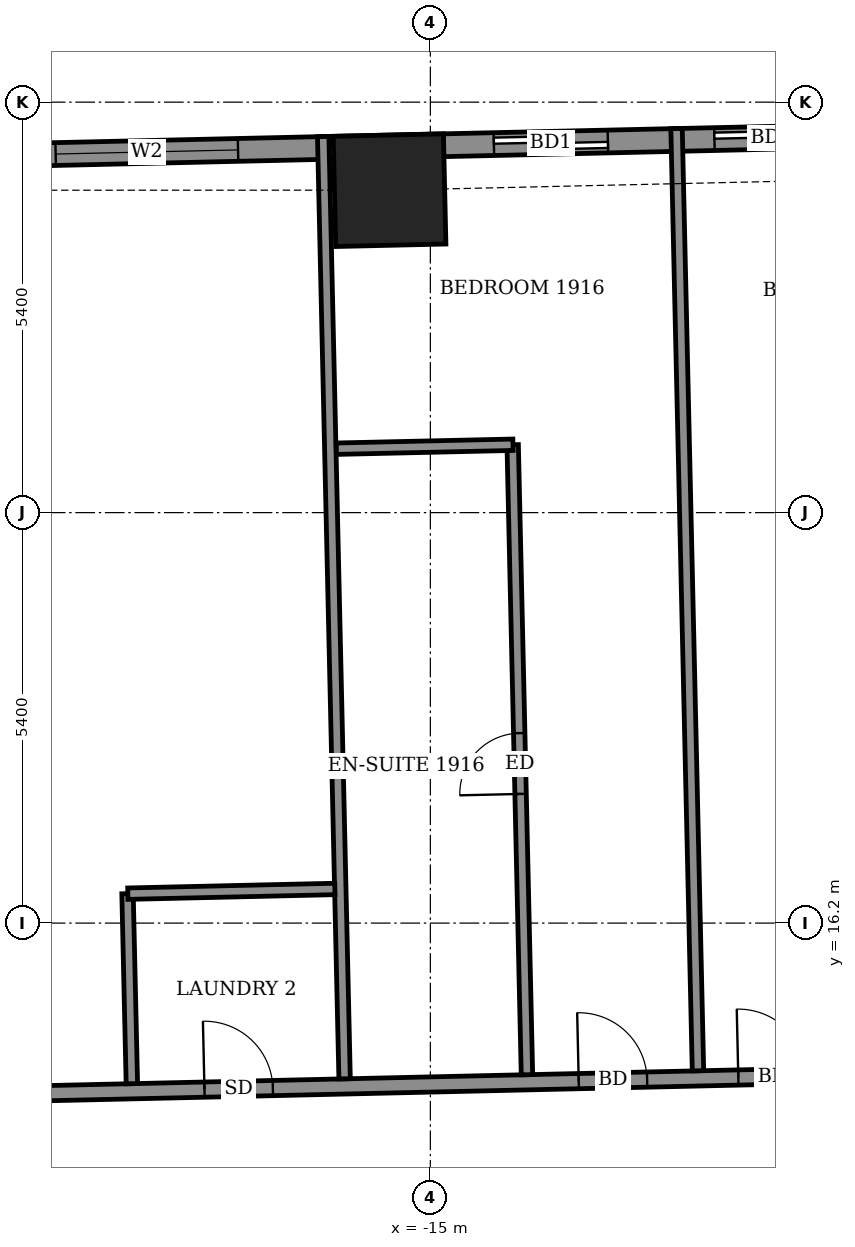
"""IFC4 building model, lengths in metres.
Left out: names, types, materials, properties, quantities, classifications, styles, units other than length and angle.
Written with IfcOpenShell. Run it as: python <this file> out.ifc"""

import sys

from ifc_helpers import new_model, si_unit, direction, frame, frame_2d, origin, origin_2d, place, context, subcontext, project, spatial, rectangle, extrude, element, fill, save


model = new_model("IFC4")
c1 = context("Model", 3, precision=1e-05, world=origin(), true_north=direction((0.0, 1.0)))
c2 = subcontext(c1, "Body", "Model", "MODEL_VIEW")
j1 = project(units=[si_unit("LENGTHUNIT", "METRE"), si_unit("PLANEANGLEUNIT", "RADIAN")], contexts=[c1])
p1 = place(None, origin())
s1 = spatial("IfcSite", under=j1, at=p1, CompositionType="ELEMENT")
p2 = place(p1, origin())
s2 = spatial("IfcBuilding", under=s1, at=p2, CompositionType="ELEMENT")
p3 = place(p2, frame((0.0, 0.0, 79.3)))
s3 = spatial("IfcBuildingStorey", under=s2, at=p3, CompositionType="ELEMENT", Elevation=79.3)
p4 = place(p3, frame((-15.537, 25.842, -0.55), z_axis=(0.0, 0.0, 1.0), x_axis=(-0.999743323945, -0.022655821028, 0.0)))
e1 = element("IfcColumn", 1, at=p4, inside=s3, PredefinedType="COLUMN", context=c2, shape_type="SweptSolid", body=[
    extrude(rectangle(XDim=1.45, YDim=1.45, at=origin_2d()), origin(), (0.0, 0.0, 1.0), 3.6),
])
p5 = place(p3, frame((24.809, 27.333, 0.0), z_axis=(0.0, 0.0, 1.0), x_axis=(-0.999742489858, -0.022692597327, 0.0)))
e2 = element("IfcWall", 2, at=p5, inside=s3, PredefinedType="SOLIDWALL", context=c2, shape_type="SweptSolid", body=[
    extrude(rectangle(XDim=46.972, YDim=0.3, at=frame_2d((23.486, 0.0))), origin(), (0.0, 0.0, 1.0), 3.05),
])
p6 = place(p5, frame((2.536, 0.0, 0.0)))
e3 = element("IfcOpeningElement", 3, at=p6, cuts=e2, PredefinedType="OPENING", context=c2, shape_type="SweptSolid", body=[
    extrude(rectangle(XDim=1.5, YDim=2.4, at=frame_2d((0.75, 1.2))), frame((0.0, 0.16, 0.0), z_axis=(0.0, -1.0, 0.0), x_axis=(1.0, 0.0, 0.0)), (0.0, 0.0, 1.0), 0.32),
])
p7 = place(p5, frame((7.726, 0.0, 0.0)))
e4 = element("IfcOpeningElement", 4, at=p7, cuts=e2, PredefinedType="OPENING", context=c2, shape_type="SweptSolid", body=[
    extrude(rectangle(XDim=1.5, YDim=2.4, at=frame_2d((0.75, 1.2))), frame((0.0, 0.16, 0.0), z_axis=(0.0, -1.0, 0.0), x_axis=(1.0, 0.0, 0.0)), (0.0, 0.0, 1.0), 0.32),
])
p8 = place(p5, frame((10.627, 0.0, 0.0)))
e5 = element("IfcOpeningElement", 5, at=p8, cuts=e2, PredefinedType="OPENING", context=c2, shape_type="SweptSolid", body=[
    extrude(rectangle(XDim=1.5, YDim=2.4, at=frame_2d((0.75, 1.2))), frame((0.0, 0.16, 0.0), z_axis=(0.0, -1.0, 0.0), x_axis=(1.0, 0.0, 0.0)), (0.0, 0.0, 1.0), 0.32),
])
p9 = place(p5, frame((15.872, 0.0, 0.0)))
e6 = element("IfcOpeningElement", 6, at=p9, cuts=e2, PredefinedType="OPENING", context=c2, shape_type="SweptSolid", body=[
    extrude(rectangle(XDim=1.5, YDim=2.4, at=frame_2d((0.75, 1.2))), frame((0.0, 0.16, 0.0), z_axis=(0.0, -1.0, 0.0), x_axis=(1.0, 0.0, 0.0)), (0.0, 0.0, 1.0), 0.32),
])
p10 = place(p5, frame((21.253, 0.0, 0.0)))
e7 = element("IfcOpeningElement", 7, at=p10, cuts=e2, PredefinedType="OPENING", context=c2, shape_type="SweptSolid", body=[
    extrude(rectangle(XDim=1.5, YDim=2.4, at=frame_2d((0.75, 1.2))), frame((0.0, 0.16, 0.0), z_axis=(0.0, -1.0, 0.0), x_axis=(1.0, 0.0, 0.0)), (0.0, 0.0, 1.0), 0.32),
])
p11 = place(p5, frame((24.155, 0.0, 0.0)))
e8 = element("IfcOpeningElement", 8, at=p11, cuts=e2, PredefinedType="OPENING", context=c2, shape_type="SweptSolid", body=[
    extrude(rectangle(XDim=1.5, YDim=2.4, at=frame_2d((0.75, 1.2))), frame((0.0, 0.16, 0.0), z_axis=(0.0, -1.0, 0.0), x_axis=(1.0, 0.0, 0.0)), (0.0, 0.0, 1.0), 0.32),
])
p12 = place(p5, frame((29.247, 0.0, 0.0)))
e9 = element("IfcOpeningElement", 9, at=p12, cuts=e2, PredefinedType="OPENING", context=c2, shape_type="SweptSolid", body=[
    extrude(rectangle(XDim=1.5, YDim=2.4, at=frame_2d((0.75, 1.2))), frame((0.0, 0.16, 0.0), z_axis=(0.0, -1.0, 0.0), x_axis=(1.0, 0.0, 0.0)), (0.0, 0.0, 1.0), 0.32),
])
p13 = place(p5, frame((34.581, 0.0, 0.0)))
e10 = element("IfcOpeningElement", 10, at=p13, cuts=e2, PredefinedType="OPENING", context=c2, shape_type="SweptSolid", body=[
    extrude(rectangle(XDim=1.5, YDim=2.4, at=frame_2d((0.75, 1.2))), frame((0.0, 0.16, 0.0), z_axis=(0.0, -1.0, 0.0), x_axis=(1.0, 0.0, 0.0)), (0.0, 0.0, 1.0), 0.32),
])
p14 = place(p5, frame((37.483, 0.0, 0.0)))
e11 = element("IfcOpeningElement", 11, at=p14, cuts=e2, PredefinedType="OPENING", context=c2, shape_type="SweptSolid", body=[
    extrude(rectangle(XDim=1.5, YDim=2.4, at=frame_2d((0.75, 1.2))), frame((0.0, 0.16, 0.0), z_axis=(0.0, -1.0, 0.0), x_axis=(1.0, 0.0, 0.0)), (0.0, 0.0, 1.0), 0.32),
])
p15 = place(p5, frame((42.35, 0.0, 0.9)))
e12 = element("IfcOpeningElement", 12, at=p15, cuts=e2, PredefinedType="OPENING", context=c2, shape_type="SweptSolid", body=[
    extrude(rectangle(XDim=2.4, YDim=1.5, at=frame_2d((1.2, 0.75))), frame((0.0, 0.16, 0.0), z_axis=(0.0, -1.0, 0.0), x_axis=(1.0, 0.0, 0.0)), (0.0, 0.0, 1.0), 0.32),
])
p16 = place(p3, frame((-24.895, 13.852, 0.0), z_axis=(0.0, 0.0, 1.0), x_axis=(0.999742765181, 0.02268046447, 0.0)))
e13 = element("IfcWall", 13, at=p16, inside=s3, PredefinedType="PARTITIONING", context=c2, shape_type="SweptSolid", body=[
    extrude(rectangle(XDim=52.422, YDim=0.2, at=frame_2d((26.211, 0.0))), origin(), (0.0, 0.0, 1.0), 3.05),
])
p17 = place(p16, frame((50.186, 0.0, 0.0)))
e14 = element("IfcOpeningElement", 14, at=p17, cuts=e13, PredefinedType="OPENING", context=c2, shape_type="SweptSolid", body=[
    extrude(rectangle(XDim=1.0, YDim=2.1, at=frame_2d((0.5, 1.05))), frame((0.0, 0.11, 0.0), z_axis=(0.0, -1.0, 0.0), x_axis=(1.0, 0.0, 0.0)), (0.0, 0.0, 1.0), 0.22),
])
p18 = place(p16, frame((45.175, 0.0, 0.0)))
e15 = element("IfcOpeningElement", 15, at=p18, cuts=e13, PredefinedType="OPENING", context=c2, shape_type="SweptSolid", body=[
    extrude(rectangle(XDim=0.9, YDim=2.1, at=frame_2d((0.45, 1.05))), frame((0.0, 0.11, 0.0), z_axis=(0.0, -1.0, 0.0), x_axis=(1.0, 0.0, 0.0)), (0.0, 0.0, 1.0), 0.22),
])
p19 = place(p16, frame((40.625, 0.0, 0.0)))
e16 = element("IfcOpeningElement", 16, at=p19, cuts=e13, PredefinedType="OPENING", context=c2, shape_type="SweptSolid", body=[
    extrude(rectangle(XDim=0.9, YDim=2.1, at=frame_2d((0.45, 1.05))), frame((0.0, 0.11, 0.0), z_axis=(0.0, -1.0, 0.0), x_axis=(1.0, 0.0, 0.0)), (0.0, 0.0, 1.0), 0.22),
])
p20 = place(p16, frame((38.65, 0.0, 0.0)))
e17 = element("IfcOpeningElement", 17, at=p20, cuts=e13, PredefinedType="OPENING", context=c2, shape_type="SweptSolid", body=[
    extrude(rectangle(XDim=0.9, YDim=2.1, at=frame_2d((0.45, 1.05))), frame((0.0, 0.11, 0.0), z_axis=(0.0, -1.0, 0.0), x_axis=(1.0, 0.0, 0.0)), (0.0, 0.0, 1.0), 0.22),
])
p21 = place(p16, frame((31.725, 0.0, 0.0)))
e18 = element("IfcOpeningElement", 18, at=p21, cuts=e13, PredefinedType="OPENING", context=c2, shape_type="SweptSolid", body=[
    extrude(rectangle(XDim=0.9, YDim=2.1, at=frame_2d((0.45, 1.05))), frame((0.0, 0.11, 0.0), z_axis=(0.0, -1.0, 0.0), x_axis=(1.0, 0.0, 0.0)), (0.0, 0.0, 1.0), 0.22),
])
p22 = place(p16, frame((29.575, 0.0, 0.0)))
e19 = element("IfcOpeningElement", 19, at=p22, cuts=e13, PredefinedType="OPENING", context=c2, shape_type="SweptSolid", body=[
    extrude(rectangle(XDim=0.9, YDim=2.1, at=frame_2d((0.45, 1.05))), frame((0.0, 0.11, 0.0), z_axis=(0.0, -1.0, 0.0), x_axis=(1.0, 0.0, 0.0)), (0.0, 0.0, 1.0), 0.22),
])
p23 = place(p16, frame((22.75, 0.0, 0.0)))
e20 = element("IfcOpeningElement", 20, at=p23, cuts=e13, PredefinedType="OPENING", context=c2, shape_type="SweptSolid", body=[
    extrude(rectangle(XDim=0.9, YDim=2.1, at=frame_2d((0.45, 1.05))), frame((0.0, 0.11, 0.0), z_axis=(0.0, -1.0, 0.0), x_axis=(1.0, 0.0, 0.0)), (0.0, 0.0, 1.0), 0.22),
])
p24 = place(p16, frame((20.75, 0.0, 0.0)))
e21 = element("IfcOpeningElement", 21, at=p24, cuts=e13, PredefinedType="OPENING", context=c2, shape_type="SweptSolid", body=[
    extrude(rectangle(XDim=0.9, YDim=2.1, at=frame_2d((0.45, 1.05))), frame((0.0, 0.11, 0.0), z_axis=(0.0, -1.0, 0.0), x_axis=(1.0, 0.0, 0.0)), (0.0, 0.0, 1.0), 0.22),
])
p25 = place(p16, frame((13.95, 0.0, 0.0)))
e22 = element("IfcOpeningElement", 22, at=p25, cuts=e13, PredefinedType="OPENING", context=c2, shape_type="SweptSolid", body=[
    extrude(rectangle(XDim=0.9, YDim=2.1, at=frame_2d((0.45, 1.05))), frame((0.0, 0.11, 0.0), z_axis=(0.0, -1.0, 0.0), x_axis=(1.0, 0.0, 0.0)), (0.0, 0.0, 1.0), 0.22),
])
p26 = place(p16, frame((11.85, 0.0, 0.0)))
e23 = element("IfcOpeningElement", 23, at=p26, cuts=e13, PredefinedType="OPENING", context=c2, shape_type="SweptSolid", body=[
    extrude(rectangle(XDim=0.9, YDim=2.1, at=frame_2d((0.45, 1.05))), frame((0.0, 0.11, 0.0), z_axis=(0.0, -1.0, 0.0), x_axis=(1.0, 0.0, 0.0)), (0.0, 0.0, 1.0), 0.22),
])
p27 = place(p16, frame((1.425, 0.0, 0.0)))
e24 = element("IfcOpeningElement", 24, at=p27, cuts=e13, PredefinedType="OPENING", context=c2, shape_type="SweptSolid", body=[
    extrude(rectangle(XDim=1.0, YDim=2.1, at=frame_2d((0.5, 1.05))), frame((0.0, 0.11, 0.0), z_axis=(0.0, -1.0, 0.0), x_axis=(1.0, 0.0, 0.0)), (0.0, 0.0, 1.0), 0.22),
])
p28 = place(p16, frame((6.925, 0.0, 0.0)))
e25 = element("IfcOpeningElement", 25, at=p28, cuts=e13, PredefinedType="OPENING", context=c2, shape_type="SweptSolid", body=[
    extrude(rectangle(XDim=0.9, YDim=2.1, at=frame_2d((0.45, 1.05))), frame((0.0, 0.11, 0.0), z_axis=(0.0, -1.0, 0.0), x_axis=(1.0, 0.0, 0.0)), (0.0, 0.0, 1.0), 0.22),
])
p29 = place(p3, frame((-18.927, 14.087, 0.0), z_axis=(0.0, 0.0, 1.0), x_axis=(-0.02274801823, 0.999741230352, 0.0)))
e26 = element("IfcWall", 26, at=p29, inside=s3, PredefinedType="PARTITIONING", context=c2, shape_type="SweptSolid", body=[
    extrude(rectangle(XDim=2.501, YDim=0.15, at=frame_2d((1.25, 0.0))), origin(), (0.0, 0.0, 1.0), 3.05),
])
p30 = place(p3, frame((-16.128, 14.151, 0.0), z_axis=(0.0, 0.0, 1.0), x_axis=(-0.022739741597, 0.999741418644, 0.0)))
e27 = element("IfcWall", 27, at=p30, inside=s3, PredefinedType="PARTITIONING", context=c2, shape_type="SweptSolid", body=[
    extrude(rectangle(XDim=12.4, YDim=0.15, at=frame_2d((6.2, 0.0))), origin(), (0.0, 0.0, 1.0), 2.55),
])
p31 = place(p3, frame((-13.729, 14.205, 0.0), z_axis=(0.0, 0.0, 1.0), x_axis=(-0.022676583998, 0.999742853207, 0.0)))
e28 = element("IfcWall", 28, at=p31, inside=s3, PredefinedType="PARTITIONING", context=c2, shape_type="SweptSolid", body=[
    extrude(rectangle(XDim=8.29, YDim=0.15, at=frame_2d((4.145, 0.0))), origin(), (0.0, 0.0, 1.0), 3.05),
])
p32 = place(p31, frame((3.695, 0.0, 0.0)))
e29 = element("IfcOpeningElement", 29, at=p32, cuts=e28, PredefinedType="OPENING", context=c2, shape_type="SweptSolid", body=[
    extrude(rectangle(XDim=0.8, YDim=2.1, at=frame_2d((0.4, 1.05))), frame((0.0, 0.085, 0.0), z_axis=(0.0, -1.0, 0.0), x_axis=(1.0, 0.0, 0.0)), (0.0, 0.0, 1.0), 0.17),
])
p33 = place(p3, frame((-11.479, 14.257, 0.0), z_axis=(0.0, 0.0, 1.0), x_axis=(-0.022741979748, 0.999741367733, 0.0)))
e30 = element("IfcWall", 30, at=p33, inside=s3, PredefinedType="PARTITIONING", context=c2, shape_type="SweptSolid", body=[
    extrude(rectangle(XDim=12.399, YDim=0.15, at=frame_2d((6.2, 0.0))), origin(), (0.0, 0.0, 1.0), 2.55),
])
p34 = place(p3, frame((-18.98, 16.587, 0.0), z_axis=(0.0, 0.0, 1.0), x_axis=(0.999740955847, 0.022760079124, 0.0)))
e31 = element("IfcWall", 31, at=p34, inside=s3, PredefinedType="PARTITIONING", context=c2, shape_type="SweptSolid", body=[
    extrude(rectangle(XDim=2.725, YDim=0.15, at=frame_2d((1.362, 0.0))), origin(), (0.0, 0.0, 1.0), 3.05),
])
p35 = place(p3, frame((-16.237, 22.441, 0.0), z_axis=(0.0, 0.0, 1.0), x_axis=(0.999749744571, 0.022370700241, 0.0)))
e32 = element("IfcWall", 32, at=p35, inside=s3, PredefinedType="PARTITIONING", context=c2, shape_type="SweptSolid", body=[
    extrude(rectangle(XDim=2.324, YDim=0.15, at=frame_2d((1.162, 0.0))), origin(), (0.0, 0.0, 1.0), 3.05),
])
p36 = place(p13, origin())
e33 = element("IfcDoor", 33, at=p36, inside=s3, OperationType="SLIDING_TO_LEFT", PredefinedType="DOOR", context=c2, shape_type="SweptSolid", body=[
    extrude(rectangle(XDim=1.5, YDim=2.4, at=frame_2d((0.75, 1.2))), frame((0.0, 0.025, 0.0), z_axis=(0.0, -1.0, 0.0), x_axis=(1.0, 0.0, 0.0)), (0.0, 0.0, 1.0), 0.05),
])
fill(e10, e33)
p37 = place(p14, origin())
e34 = element("IfcDoor", 34, at=p37, inside=s3, OperationType="SLIDING_TO_LEFT", PredefinedType="DOOR", context=c2, shape_type="SweptSolid", body=[
    extrude(rectangle(XDim=1.5, YDim=2.4, at=frame_2d((0.75, 1.2))), frame((0.0, 0.025, 0.0), z_axis=(0.0, -1.0, 0.0), x_axis=(1.0, 0.0, 0.0)), (0.0, 0.0, 1.0), 0.05),
])
fill(e11, e34)
p38 = place(p15, origin())
e35 = element("IfcWindow", 35, at=p38, inside=s3, PartitioningType="DOUBLE_PANEL_VERTICAL", PredefinedType="WINDOW", context=c2, shape_type="SweptSolid", body=[
    extrude(rectangle(XDim=2.4, YDim=1.5, at=frame_2d((1.2, 0.75))), frame((0.0, 0.03, 0.0), z_axis=(0.0, -1.0, 0.0), x_axis=(1.0, 0.0, 0.0)), (0.0, 0.0, 1.0), 0.06),
])
fill(e12, e35)
p39 = place(p25, origin())
e36 = element("IfcDoor", 36, at=p39, inside=s3, OperationType="SINGLE_SWING_LEFT", PredefinedType="DOOR", context=c2, shape_type="SweptSolid", body=[
    extrude(rectangle(XDim=0.9, YDim=2.1, at=frame_2d((0.45, 1.05))), frame((0.0, 0.025, 0.0), z_axis=(0.0, -1.0, 0.0), x_axis=(1.0, 0.0, 0.0)), (0.0, 0.0, 1.0), 0.05),
])
fill(e22, e36)
p40 = place(p26, origin())
e37 = element("IfcDoor", 37, at=p40, inside=s3, OperationType="SINGLE_SWING_RIGHT", PredefinedType="DOOR", context=c2, shape_type="SweptSolid", body=[
    extrude(rectangle(XDim=0.9, YDim=2.1, at=frame_2d((0.45, 1.05))), frame((0.0, 0.025, 0.0), z_axis=(0.0, -1.0, 0.0), x_axis=(1.0, 0.0, 0.0)), (0.0, 0.0, 1.0), 0.05),
])
fill(e23, e37)
p41 = place(p32, origin())
e38 = element("IfcDoor", 38, at=p41, inside=s3, OperationType="SINGLE_SWING_RIGHT", PredefinedType="DOOR", context=c2, shape_type="SweptSolid", body=[
    extrude(rectangle(XDim=0.8, YDim=2.1, at=frame_2d((0.4, 1.05))), frame((0.0, 0.025, 0.0), z_axis=(0.0, -1.0, 0.0), x_axis=(1.0, 0.0, 0.0)), (0.0, 0.0, 1.0), 0.05),
])
fill(e29, e38)
p42 = place(p28, origin())
e39 = element("IfcDoor", 39, at=p42, inside=s3, OperationType="SINGLE_SWING_RIGHT", PredefinedType="DOOR", context=c2, shape_type="SweptSolid", body=[
    extrude(rectangle(XDim=0.9, YDim=2.1, at=frame_2d((0.45, 1.05))), frame((0.0, 0.025, 0.0), z_axis=(0.0, -1.0, 0.0), x_axis=(1.0, 0.0, 0.0)), (0.0, 0.0, 1.0), 0.05),
])
fill(e25, e39)
save(model, sys.argv[1])
